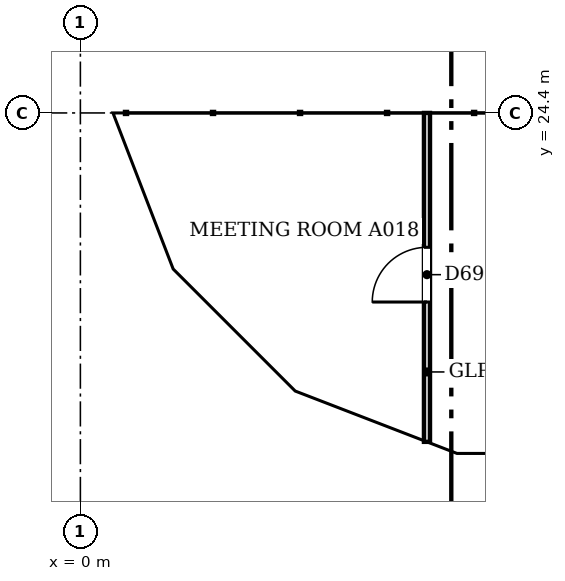
"""IFC4 building model, lengths in metres.
Left out: names, types, materials, properties, quantities, classifications, styles, units other than length and angle.
Written with IfcOpenShell. Run it as: python <this file> out.ifc"""

import sys

from ifc_helpers import new_model, si_unit, direction, frame, frame_2d, origin, place, context, subcontext, project, spatial, polyline, rectangle, outline, extrude, faceted_brep, source, transform, mapped, element, fill, save


model = new_model("IFC4")
c1 = context("Model", 3, precision=1e-05, world=origin(), true_north=direction((0.0, 1.0)))
c2 = subcontext(c1, "Body", "Model", "MODEL_VIEW")
j1 = project(units=[si_unit("LENGTHUNIT", "METRE"), si_unit("PLANEANGLEUNIT", "RADIAN")], contexts=[c1])
p1 = place(None, origin())
s1 = spatial("IfcSite", under=j1, at=p1, CompositionType="ELEMENT")
p2 = place(p1, origin())
s2 = spatial("IfcBuilding", under=s1, at=p2, CompositionType="ELEMENT")
p3 = place(p2, frame((0.0, 0.0, 95.2)))
s3 = spatial("IfcBuildingStorey", under=s2, at=p3, CompositionType="ELEMENT", Elevation=95.2)
m1 = source(origin(), c2, "Body", "Brep", [
    faceted_brep([(3.003, -0.25, 0.0), (3.05, -0.25, 0.06), (3.05, -0.25, 7.54), (3.003, -0.25, 7.6), (0.0, -0.25, 3.8), (0.0, 0.25, 3.8), (2.957, 0.25, 7.541), (2.957, 0.25, 0.059), (3.003, 0.0, 0.0), (3.003, 0.0, 7.6)], [[[0, 1, 2, 3, 4]], [[5, 6, 7]], [[1, 0, 8]], [[9, 3, 2]], [[6, 5, 4, 3, 9]], [[5, 7, 8, 0, 4]], [[1, 8, 7, 6, 9, 2]]]),
])
p4 = place(p3, frame((0.25, 27.45, -3.8), z_axis=(0.0, 0.0, 1.0), x_axis=(0.0, -1.0, 0.0)))
e1 = element("IfcWall", 1, at=p4, inside=s3, PredefinedType="SOLIDWALL", context=c2, shape_type="MappedRepresentation", body=[
    mapped(m1, transform((0.0, 0.0, 0.0), scale=1.0)),
])
m2 = source(origin(), c2, "Body", "SweptSolid", [
    extrude(outline(polyline([(2.803, 6.944), (0.319, 3.8), (2.803, 0.656), (2.803, 6.944)])), frame((0.0, 0.26, 0.0), z_axis=(0.0, -1.0, 0.0), x_axis=(1.0, 0.0, 0.0)), (0.0, 0.0, 1.0), 0.52),
])
p5 = place(p4, origin())
e2 = element("IfcOpeningElement", 2, at=p5, cuts=e1, PredefinedType="OPENING", context=c2, shape_type="MappedRepresentation", body=[
    mapped(m2, transform((0.0, 0.0, 0.0), scale=1.0)),
])
m3 = source(origin(), c2, "Body", "Brep", [
    faceted_brep([(0.047, -0.25, 0.0), (2.997, -0.25, 3.8), (0.047, -0.25, 7.6), (0.0, -0.25, 7.541), (0.0, -0.25, 0.059), (0.093, 0.25, 7.54), (2.944, 0.25, 3.868), (2.944, 0.25, 3.732), (0.093, 0.25, 0.06), (2.997, 0.0, 3.8), (0.047, 0.0, 0.0), (0.047, 0.0, 7.6)], [[[0, 1, 2, 3, 4]], [[5, 6, 7, 8]], [[8, 7, 9, 1, 0, 10]], [[6, 5, 11, 2, 1, 9]], [[3, 2, 11]], [[10, 0, 4]], [[8, 10, 4, 3, 11, 5]], [[9, 7, 6]]]),
])
p6 = place(p3, frame((0.233, 24.49, -3.8), z_axis=(0.0, 0.0, 1.0), x_axis=(0.359901446078, -0.932990326376, 0.0)))
e3 = element("IfcWall", 3, at=p6, inside=s3, PredefinedType="SOLIDWALL", context=c2, shape_type="MappedRepresentation", body=[
    mapped(m3, transform((0.0, 0.0, 0.0), scale=1.0)),
])
m4 = source(origin(), c2, "Body", "SweptSolid", [
    extrude(outline(polyline([(0.247, 0.665), (2.681, 3.8), (0.247, 6.935), (0.247, 0.665)])), frame((0.0, 0.26, 0.0), z_axis=(0.0, -1.0, 0.0), x_axis=(1.0, 0.0, 0.0)), (0.0, 0.0, 1.0), 0.52),
])
p7 = place(p6, origin())
e4 = element("IfcOpeningElement", 4, at=p7, cuts=e3, PredefinedType="OPENING", context=c2, shape_type="MappedRepresentation", body=[
    mapped(m4, transform((0.0, 0.0, 0.0), scale=1.0)),
])
m5 = source(origin(), c2, "Body", "Brep", [
    faceted_brep([(2.944, -0.25, 0.0), (2.997, -0.25, 0.068), (2.997, -0.25, 7.532), (2.944, -0.25, 7.6), (0.0, -0.25, 3.8), (0.053, 0.25, 3.868), (2.891, 0.25, 7.532), (2.891, 0.25, 0.068), (0.053, 0.25, 3.732), (2.944, 0.0, 0.0), (2.944, 0.0, 7.6), (0.0, 0.0, 3.8)], [[[0, 1, 2, 3, 4]], [[5, 6, 7, 8]], [[1, 0, 9]], [[10, 3, 2]], [[6, 5, 11, 4, 3, 10]], [[8, 7, 9, 0, 4, 11]], [[8, 11, 5]], [[1, 9, 7, 6, 10, 2]]]),
])
p8 = place(p3, frame((1.312, 21.694, -3.8), z_axis=(0.0, 0.0, 1.0), x_axis=(0.707066050402, -0.707147509625, 0.0)))
e5 = element("IfcWall", 5, at=p8, inside=s3, PredefinedType="SOLIDWALL", context=c2, shape_type="MappedRepresentation", body=[
    mapped(m5, transform((0.0, 0.0, 0.0), scale=1.0)),
])
m6 = source(origin(), c2, "Body", "SweptSolid", [
    extrude(outline(polyline([(2.744, 6.934), (0.316, 3.8), (2.744, 0.667), (2.744, 6.934)])), frame((0.0, 0.26, 0.0), z_axis=(0.0, -1.0, 0.0), x_axis=(1.0, 0.0, 0.0)), (0.0, 0.0, 1.0), 0.52),
])
p9 = place(p8, origin())
e6 = element("IfcOpeningElement", 6, at=p9, cuts=e5, PredefinedType="OPENING", context=c2, shape_type="MappedRepresentation", body=[
    mapped(m6, transform((0.0, 0.0, 0.0), scale=1.0)),
])
m7 = source(origin(), c2, "Body", "Brep", [
    faceted_brep([(0.053, -0.25, 0.0), (3.003, -0.25, 3.8), (0.053, -0.25, 7.6), (0.0, -0.25, 7.532), (0.0, -0.25, 0.068), (0.106, 0.25, 7.532), (2.957, 0.25, 3.86), (2.957, 0.25, 3.74), (0.106, 0.25, 0.068), (3.003, 0.0, 3.8), (0.053, 0.0, 0.0), (0.053, 0.0, 7.6)], [[[0, 1, 2, 3, 4]], [[5, 6, 7, 8]], [[8, 7, 9, 1, 0, 10]], [[6, 5, 11, 2, 1, 9]], [[3, 2, 11]], [[10, 0, 4]], [[8, 10, 4, 3, 11, 5]], [[9, 7, 6]]]),
])
p10 = place(p3, frame((3.344, 19.631, -3.8), z_axis=(0.0, 0.0, 1.0), x_axis=(0.933007896601, -0.359855894603, 0.0)))
e7 = element("IfcWall", 7, at=p10, inside=s3, PredefinedType="SOLIDWALL", context=c2, shape_type="MappedRepresentation", body=[
    mapped(m7, transform((0.0, 0.0, 0.0), scale=1.0)),
])
m8 = source(origin(), c2, "Body", "SweptSolid", [
    extrude(outline(polyline([(0.253, 0.665), (2.687, 3.8), (0.253, 6.935), (0.253, 0.665)])), frame((0.0, 0.26, 0.0), z_axis=(0.0, -1.0, 0.0), x_axis=(1.0, 0.0, 0.0)), (0.0, 0.0, 1.0), 0.52),
])
p11 = place(p10, origin())
e8 = element("IfcOpeningElement", 8, at=p11, cuts=e7, PredefinedType="OPENING", context=c2, shape_type="MappedRepresentation", body=[
    mapped(m8, transform((0.0, 0.0, 0.0), scale=1.0)),
])
m9 = source(origin(), c2, "Body", "Brep", [
    faceted_brep([(3.003, -0.25, 0.0), (6.053, -0.25, 3.8), (3.003, -0.25, 7.6), (0.0, -0.25, 3.8), (0.047, 0.25, 3.859), (3.003, 0.25, 7.6), (6.053, 0.25, 3.8), (3.003, 0.25, 0.0), (0.047, 0.25, 3.741), (0.0, 0.0, 3.8)], [[[0, 1, 2, 3]], [[4, 5, 6, 7, 8]], [[7, 6, 1, 0]], [[6, 5, 2, 1]], [[5, 4, 9, 3, 2]], [[8, 7, 0, 3, 9]], [[8, 9, 4]]]),
])
p12 = place(p3, frame((6.146, 18.55, -3.8), z_axis=(0.0, 0.0, 1.0), x_axis=(1.0, 0.0, 0.0)))
e9 = element("IfcWall", 9, at=p12, inside=s3, PredefinedType="SOLIDWALL", context=c2, shape_type="MappedRepresentation", body=[
    mapped(m9, transform((0.0, 0.0, 0.0), scale=1.0)),
])
m10 = source(origin(), c2, "Body", "SweptSolid", [
    extrude(outline(polyline([(3.005, 0.401), (5.733, 3.8), (3.005, 7.199), (0.319, 3.8), (3.005, 0.401)])), frame((0.0, 0.26, 0.0), z_axis=(0.0, -1.0, 0.0), x_axis=(1.0, 0.0, 0.0)), (0.0, 0.0, 1.0), 0.52),
])
p13 = place(p12, origin())
e10 = element("IfcOpeningElement", 10, at=p13, cuts=e9, PredefinedType="OPENING", context=c2, shape_type="MappedRepresentation", body=[
    mapped(m10, transform((0.0, 0.0, 0.0), scale=1.0)),
])
p14 = place(p2, frame((0.0, 0.0, 99.0)))
s4 = spatial("IfcBuildingStorey", under=s2, at=p14, CompositionType="ELEMENT", Elevation=99.0)
m11 = source(origin(), c2, "Body", "Brep", [
    faceted_brep([(3.05, -0.25, 0.0), (6.053, -0.25, 3.8), (3.05, -0.25, 7.6), (0.0, -0.25, 3.8), (0.0, 0.25, 3.8), (3.05, 0.25, 7.6), (6.007, 0.25, 3.859), (6.007, 0.25, 3.741), (3.05, 0.25, 0.0), (6.053, 0.0, 3.8)], [[[0, 1, 2, 3]], [[4, 5, 6, 7, 8]], [[8, 7, 9, 1, 0]], [[6, 5, 2, 1, 9]], [[5, 4, 3, 2]], [[4, 8, 0, 3]], [[9, 7, 6]]]),
])
p15 = place(p14, frame((0.25, 30.5, -3.8), z_axis=(0.0, 0.0, 1.0), x_axis=(0.0, -1.0, 0.0)))
e11 = element("IfcWall", 11, at=p15, inside=s4, PredefinedType="SOLIDWALL", context=c2, shape_type="MappedRepresentation", body=[
    mapped(m11, transform((0.0, 0.0, 0.0), scale=1.0)),
])
m12 = source(origin(), c2, "Body", "SweptSolid", [
    extrude(outline(polyline([(3.049, 0.401), (5.735, 3.8), (3.049, 7.199), (0.321, 3.8), (3.049, 0.401)])), frame((0.0, 0.26, 0.0), z_axis=(0.0, -1.0, 0.0), x_axis=(1.0, 0.0, 0.0)), (0.0, 0.0, 1.0), 0.52),
])
p16 = place(p15, origin())
e12 = element("IfcOpeningElement", 12, at=p16, cuts=e11, PredefinedType="OPENING", context=c2, shape_type="MappedRepresentation", body=[
    mapped(m12, transform((0.0, 0.0, 0.0), scale=1.0)),
])
m13 = source(origin(), c2, "Body", "Brep", [
    faceted_brep([(2.95, -0.25, 0.0), (3.003, -0.25, 0.068), (3.003, -0.25, 7.532), (2.95, -0.25, 7.6), (0.0, -0.25, 3.8), (0.047, 0.25, 3.86), (2.898, 0.25, 7.532), (2.898, 0.25, 0.068), (0.047, 0.25, 3.74), (2.95, 0.0, 0.0), (2.95, 0.0, 7.6), (0.0, 0.0, 3.8)], [[[0, 1, 2, 3, 4]], [[5, 6, 7, 8]], [[1, 0, 9]], [[10, 3, 2]], [[6, 5, 11, 4, 3, 10]], [[8, 7, 9, 0, 4, 11]], [[8, 11, 5]], [[1, 9, 7, 6, 10, 2]]]),
])
p17 = place(p14, frame((0.25, 24.447, -3.8), z_axis=(0.0, 0.0, 1.0), x_axis=(0.35992665181, -0.932980602862, 0.0)))
e13 = element("IfcWall", 13, at=p17, inside=s4, PredefinedType="SOLIDWALL", context=c2, shape_type="MappedRepresentation", body=[
    mapped(m13, transform((0.0, 0.0, 0.0), scale=1.0)),
])
m14 = source(origin(), c2, "Body", "SweptSolid", [
    extrude(outline(polyline([(2.75, 6.935), (0.316, 3.8), (2.75, 0.665), (2.75, 6.935)])), frame((0.0, 0.26, 0.0), z_axis=(0.0, -1.0, 0.0), x_axis=(1.0, 0.0, 0.0)), (0.0, 0.0, 1.0), 0.52),
])
p18 = place(p17, origin())
e14 = element("IfcOpeningElement", 14, at=p18, cuts=e13, PredefinedType="OPENING", context=c2, shape_type="MappedRepresentation", body=[
    mapped(m14, transform((0.0, 0.0, 0.0), scale=1.0)),
])
m15 = source(origin(), c2, "Body", "Brep", [
    faceted_brep([(0.053, -0.25, 0.0), (2.997, -0.25, 3.8), (0.053, -0.25, 7.6), (0.0, -0.25, 7.532), (0.0, -0.25, 0.068), (0.106, 0.25, 7.532), (2.944, 0.25, 3.868), (2.944, 0.25, 3.732), (0.106, 0.25, 0.068), (2.997, 0.0, 3.8), (0.053, 0.0, 0.0), (0.053, 0.0, 7.6)], [[[0, 1, 2, 3, 4]], [[5, 6, 7, 8]], [[8, 7, 9, 1, 0, 10]], [[6, 5, 11, 2, 1, 9]], [[3, 2, 11]], [[10, 0, 4]], [[8, 10, 4, 3, 11, 5]], [[9, 7, 6]]]),
])
p19 = place(p14, frame((1.274, 21.731, -3.8), z_axis=(0.0, 0.0, 1.0), x_axis=(0.707147509625, -0.707066050402, 0.0)))
e15 = element("IfcWall", 15, at=p19, inside=s4, PredefinedType="SOLIDWALL", context=c2, shape_type="MappedRepresentation", body=[
    mapped(m15, transform((0.0, 0.0, 0.0), scale=1.0)),
])
m16 = source(origin(), c2, "Body", "SweptSolid", [
    extrude(outline(polyline([(0.253, 0.666), (2.681, 3.8), (0.253, 6.934), (0.253, 0.666)])), frame((0.0, 0.26, 0.0), z_axis=(0.0, -1.0, 0.0), x_axis=(1.0, 0.0, 0.0)), (0.0, 0.0, 1.0), 0.52),
])
p20 = place(p19, origin())
e16 = element("IfcOpeningElement", 16, at=p20, cuts=e15, PredefinedType="OPENING", context=c2, shape_type="MappedRepresentation", body=[
    mapped(m16, transform((0.0, 0.0, 0.0), scale=1.0)),
])
m17 = source(origin(), c2, "Body", "Brep", [
    faceted_brep([(2.95, -0.25, 0.0), (2.997, -0.25, 0.059), (2.997, -0.25, 7.541), (2.95, -0.25, 7.6), (0.0, -0.25, 3.8), (0.053, 0.25, 3.868), (2.904, 0.25, 7.54), (2.904, 0.25, 0.06), (0.053, 0.25, 3.732), (2.95, 0.0, 0.0), (2.95, 0.0, 7.6), (0.0, 0.0, 3.8)], [[[0, 1, 2, 3, 4]], [[5, 6, 7, 8]], [[1, 0, 9]], [[10, 3, 2]], [[6, 5, 11, 4, 3, 10]], [[8, 7, 9, 0, 4, 11]], [[8, 11, 5]], [[1, 9, 7, 6, 10, 2]]]),
])
p21 = place(p14, frame((3.394, 19.612, -3.8), z_axis=(0.0, 0.0, 1.0), x_axis=(0.932990326376, -0.359901446078, 0.0)))
e17 = element("IfcWall", 17, at=p21, inside=s4, PredefinedType="SOLIDWALL", context=c2, shape_type="MappedRepresentation", body=[
    mapped(m17, transform((0.0, 0.0, 0.0), scale=1.0)),
])
p22 = place(p21, origin())
e18 = element("IfcOpeningElement", 18, at=p22, cuts=e17, PredefinedType="OPENING", context=c2, shape_type="MappedRepresentation", body=[
    mapped(m14, transform((0.0, 0.0, 0.0), scale=1.0)),
])
m18 = source(origin(), c2, "Body", "Brep", [
    faceted_brep([(0.047, -0.25, 0.0), (3.05, -0.25, 3.8), (0.047, -0.25, 7.6), (0.0, -0.25, 7.54), (0.0, -0.25, 0.06), (0.093, 0.25, 7.541), (3.05, 0.25, 3.8), (0.093, 0.25, 0.059), (0.047, 0.0, 0.0), (0.047, 0.0, 7.6)], [[[0, 1, 2, 3, 4]], [[5, 6, 7]], [[7, 6, 1, 0, 8]], [[6, 5, 9, 2, 1]], [[3, 2, 9]], [[8, 0, 4]], [[7, 8, 4, 3, 9, 5]]]),
])
p23 = place(p14, frame((6.1, 18.55, -3.8), z_axis=(0.0, 0.0, 1.0), x_axis=(1.0, 0.0, 0.0)))
e19 = element("IfcWall", 19, at=p23, inside=s4, PredefinedType="SOLIDWALL", context=c2, shape_type="MappedRepresentation", body=[
    mapped(m18, transform((0.0, 0.0, 0.0), scale=1.0)),
])
m19 = source(origin(), c2, "Body", "SweptSolid", [
    extrude(outline(polyline([(0.247, 0.656), (2.731, 3.8), (0.247, 6.944), (0.247, 0.656)])), frame((0.0, 0.26, 0.0), z_axis=(0.0, -1.0, 0.0), x_axis=(1.0, 0.0, 0.0)), (0.0, 0.0, 1.0), 0.52),
])
p24 = place(p23, origin())
e20 = element("IfcOpeningElement", 20, at=p24, cuts=e19, PredefinedType="OPENING", context=c2, shape_type="MappedRepresentation", body=[
    mapped(m19, transform((0.0, 0.0, 0.0), scale=1.0)),
])
p25 = place(p3, frame((5.7, 18.99, 0.0), z_axis=(0.0, 0.0, 1.0), x_axis=(0.0, 1.0, 0.0)))
e21 = element("IfcWall", 21, at=p25, inside=s3, PredefinedType="PARTITIONING", context=c2, shape_type="SweptSolid", body=[
    extrude(rectangle(XDim=5.41, YDim=0.1, at=frame_2d((2.705, 0.0))), origin(), (0.0, 0.0, 1.0), 3.067),
])
m20 = source(origin(), c2, "Body", "SweptSolid", [
    extrude(rectangle(XDim=0.9, YDim=2.1, at=frame_2d((0.45, 1.05))), frame((0.0, 0.06, 0.0), z_axis=(0.0, -1.0, 0.0), x_axis=(1.0, 0.0, 0.0)), (0.0, 0.0, 1.0), 0.12),
])
p26 = place(p25, frame((2.3, 0.0, 0.0)))
e22 = element("IfcOpeningElement", 22, at=p26, cuts=e21, PredefinedType="OPENING", context=c2, shape_type="MappedRepresentation", body=[
    mapped(m20, transform((0.0, 0.0, 0.0), scale=1.0)),
])
m21 = source(origin(), c2, "Body", "SweptSolid", [
    extrude(rectangle(XDim=0.9, YDim=2.1, at=frame_2d((0.45, 1.05))), frame((0.0, 0.025, 0.0), z_axis=(0.0, -1.0, 0.0), x_axis=(1.0, 0.0, 0.0)), (0.0, 0.0, 1.0), 0.05),
])
p27 = place(p26, origin())
e23 = element("IfcDoor", 23, at=p27, inside=s3, OperationType="SINGLE_SWING_LEFT", PredefinedType="DOOR", context=c2, shape_type="MappedRepresentation", body=[
    mapped(m21, transform((0.0, 0.0, 0.0), scale=1.0)),
])
fill(e22, e23)
save(model, sys.argv[1])
